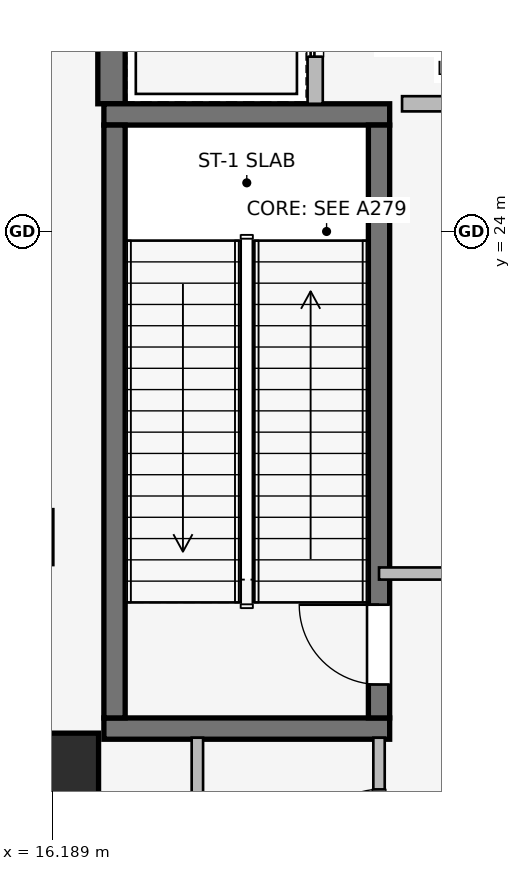
"""IFC4 building model, lengths in metres.
Left out: names, types, materials, properties, quantities, classifications, styles, units other than length and angle.
Written with IfcOpenShell. Run it as: python <this file> out.ifc"""

import sys

from ifc_helpers import new_model, si_unit, direction, frame, frame_2d, origin, origin_2d, place, context, subcontext, project, spatial, rectangle, extrude, element, fill, save


model = new_model("IFC4")
c1 = context("Model", 3, precision=1e-05, world=origin(), true_north=direction((0.0, 1.0)))
c2 = subcontext(c1, "Body", "Model", "MODEL_VIEW")
j1 = project(units=[si_unit("LENGTHUNIT", "METRE"), si_unit("PLANEANGLEUNIT", "RADIAN")], contexts=[c1])
p1 = place(None, origin())
s1 = spatial("IfcSite", under=j1, at=p1, CompositionType="ELEMENT")
p2 = place(p1, origin())
s2 = spatial("IfcBuilding", under=s1, at=p2, CompositionType="ELEMENT")
p3 = place(p2, frame((0.0, 0.0, 285.1)))
s3 = spatial("IfcBuildingStorey", under=s2, at=p3, CompositionType="ELEMENT", Elevation=285.1)
p4 = place(p3, frame((16.97, 25.68, 0.0), z_axis=(0.0, 0.0, 1.0), x_axis=(0.0, 1.0, 0.0)))
e1 = element("IfcWall", 1, at=p4, inside=s3, PredefinedType="SHEAR", context=c2, shape_type="SweptSolid", body=[
    extrude(rectangle(XDim=5.62, YDim=0.36, at=frame_2d((2.81, 0.0))), origin(), (0.0, 0.0, 1.0), 6.2),
])
for number, where, z_axis, x_axis in (
    (2, (16.87, 17.46, 0.0), (0.0, 0.0, 1.0), (1.0, 0.0, 0.0)),
    (3, (20.63, 25.54, 0.0), (0.0, 0.0, 1.0), (-1.0, 0.0, 0.0)),
):
    element("IfcWall", number, at=place(p3, frame(where, z_axis=z_axis, x_axis=x_axis)), inside=s3, PredefinedType="SHEAR", context=c2, shape_type="SweptSolid", body=[
        extrude(rectangle(XDim=3.76, YDim=0.28, at=frame_2d((1.88, 0.0))), origin(), (0.0, 0.0, 1.0), 6.2),
    ])
p5 = place(p3, frame((17.01, 25.4, 0.0), z_axis=(0.0, 0.0, 1.0), x_axis=(0.0, -1.0, 0.0)))
e4 = element("IfcWall", 4, at=p5, inside=s3, PredefinedType="SHEAR", context=c2, shape_type="SweptSolid", body=[
    extrude(rectangle(XDim=7.8, YDim=0.28, at=frame_2d((3.9, 0.0))), origin(), (0.0, 0.0, 1.0), 6.2),
])
p6 = place(p3, frame((20.49, 17.6, 0.0), z_axis=(0.0, 0.0, 1.0), x_axis=(0.0, 1.0, 0.0)))
e5 = element("IfcWall", 5, at=p6, inside=s3, PredefinedType="SHEAR", context=c2, shape_type="SweptSolid", body=[
    extrude(rectangle(XDim=7.8, YDim=0.28, at=frame_2d((3.9, 0.0))), origin(), (0.0, 0.0, 1.0), 6.2),
])
p7 = place(p6, frame((0.44, 0.0, 0.0)))
e6 = element("IfcOpeningElement", 6, at=p7, cuts=e5, PredefinedType="OPENING", context=c2, shape_type="SweptSolid", body=[
    extrude(rectangle(XDim=1.05, YDim=2.0, at=frame_2d((0.525, 1.0))), frame((0.0, 0.15, 0.0), z_axis=(0.0, -1.0, 0.0), x_axis=(1.0, 0.0, 0.0)), (0.0, 0.0, 1.0), 0.3),
])
p8 = place(p3, frame((16.3, 16.9, 0.0), z_axis=(0.0, 0.0, 1.0), x_axis=(1.0, 0.0, 0.0)))
e7 = element("IfcColumn", 7, at=p8, inside=s3, PredefinedType="COLUMN", context=c2, shape_type="SweptSolid", body=[
    extrude(rectangle(XDim=1.0, YDim=1.0, at=origin_2d()), origin(), (0.0, 0.0, 1.0), 6.2),
])
p9 = place(p3, frame((19.65, 25.68, 0.0), z_axis=(0.0, 0.0, 1.0), x_axis=(0.0, 1.0, 0.0)))
e8 = element("IfcWall", 8, at=p9, inside=s3, PredefinedType="PARTITIONING", context=c2, shape_type="SweptSolid", body=[
    extrude(rectangle(XDim=5.54, YDim=0.2, at=frame_2d((2.77, 0.0))), origin(), (0.0, 0.0, 1.0), 5.88),
])
p10 = place(p9, frame((0.62, 0.0, 0.0)))
e9 = element("IfcOpeningElement", 9, at=p10, cuts=e8, PredefinedType="OPENING", context=c2, shape_type="SweptSolid", body=[
    extrude(rectangle(XDim=1.1, YDim=2.2, at=frame_2d((0.55, 1.1))), frame((0.0, 0.11, 0.0), z_axis=(0.0, -1.0, 0.0), x_axis=(1.0, 0.0, 0.0)), (0.0, 0.0, 1.0), 0.22),
])
p11 = place(p9, frame((3.12, 0.0, 0.0)))
e10 = element("IfcOpeningElement", 10, at=p11, cuts=e8, PredefinedType="OPENING", context=c2, shape_type="SweptSolid", body=[
    extrude(rectangle(XDim=1.1, YDim=2.2, at=frame_2d((0.55, 1.1))), frame((0.0, 0.11, 0.0), z_axis=(0.0, -1.0, 0.0), x_axis=(1.0, 0.0, 0.0)), (0.0, 0.0, 1.0), 0.22),
])
p12 = place(p3, frame((20.793, 25.68, 0.0), z_axis=(0.0, 0.0, 1.0), x_axis=(1.0, 0.0, 0.0)))
e11 = element("IfcWall", 11, at=p12, inside=s3, PredefinedType="PARTITIONING", context=c2, shape_type="SweptSolid", body=[
    extrude(rectangle(XDim=2.887, YDim=0.2, at=frame_2d((1.443, 0.0))), origin(), (0.0, 0.0, 1.0), 5.88),
])
p13 = place(p3, frame((20.49, 19.5, 0.0), z_axis=(0.0, 0.0, 1.0), x_axis=(1.0, 0.0, 0.0)))
e12 = element("IfcWall", 12, at=p13, inside=s3, PredefinedType="PARTITIONING", context=c2, shape_type="SweptSolid", body=[
    extrude(rectangle(XDim=2.41, YDim=0.16, at=frame_2d((1.205, 0.0))), origin(), (0.0, 0.0, 1.0), 4.78),
])
p14 = place(p3, frame((18.1, 17.34, 0.0), z_axis=(0.0, 0.0, 1.0), x_axis=(0.0, -1.0, 0.0)))
e13 = element("IfcWall", 13, at=p14, inside=s3, PredefinedType="PARTITIONING", context=c2, shape_type="SweptSolid", body=[
    extrude(rectangle(XDim=4.133, YDim=0.15, at=frame_2d((2.066, 0.0))), origin(), (0.0, 0.0, 1.0), 5.88),
])
p15 = place(p3, frame((20.49, 13.2, 0.0), z_axis=(0.0, 0.0, 1.0), x_axis=(0.0, 1.0, 0.0)))
e14 = element("IfcWall", 14, at=p15, inside=s3, PredefinedType="PARTITIONING", context=c2, shape_type="SweptSolid", body=[
    extrude(rectangle(XDim=4.14, YDim=0.15, at=frame_2d((2.07, 0.0))), origin(), (0.0, 0.0, 1.0), 5.88),
])
p16 = place(p15, frame((0.45, 0.0, 0.0)))
e15 = element("IfcOpeningElement", 15, at=p16, cuts=e14, PredefinedType="OPENING", context=c2, shape_type="SweptSolid", body=[
    extrude(rectangle(XDim=0.86, YDim=2.0, at=frame_2d((0.43, 1.0))), frame((0.0, 0.085, 0.0), z_axis=(0.0, -1.0, 0.0), x_axis=(1.0, 0.0, 0.0)), (0.0, 0.0, 1.0), 0.17),
])
p17 = place(p15, frame((2.6, 0.0, 0.0)))
e16 = element("IfcOpeningElement", 16, at=p17, cuts=e14, PredefinedType="OPENING", context=c2, shape_type="SweptSolid", body=[
    extrude(rectangle(XDim=0.86, YDim=2.0, at=frame_2d((0.43, 1.0))), frame((0.0, 0.085, 0.0), z_axis=(0.0, -1.0, 0.0), x_axis=(1.0, 0.0, 0.0)), (0.0, 0.0, 1.0), 0.17),
])
p18 = place(p7, origin())
e17 = element("IfcDoor", 17, at=p18, inside=s3, OperationType="SINGLE_SWING_RIGHT", PredefinedType="DOOR", context=c2, shape_type="SweptSolid", body=[
    extrude(rectangle(XDim=1.05, YDim=2.0, at=frame_2d((0.525, 1.0))), frame((0.0, 0.025, 0.0), z_axis=(0.0, -1.0, 0.0), x_axis=(1.0, 0.0, 0.0)), (0.0, 0.0, 1.0), 0.05),
])
fill(e6, e17)
p19 = place(p10, origin())
e18 = element("IfcDoor", 18, at=p19, inside=s3, OperationType="SLIDING_TO_LEFT", PredefinedType="DOOR", context=c2, shape_type="SweptSolid", body=[
    extrude(rectangle(XDim=1.1, YDim=2.2, at=frame_2d((0.55, 1.1))), frame((0.0, 0.025, 0.0), z_axis=(0.0, -1.0, 0.0), x_axis=(1.0, 0.0, 0.0)), (0.0, 0.0, 1.0), 0.05),
])
fill(e9, e18)
p20 = place(p17, origin())
e19 = element("IfcDoor", 19, at=p20, inside=s3, OperationType="SINGLE_SWING_LEFT", PredefinedType="DOOR", context=c2, shape_type="SweptSolid", body=[
    extrude(rectangle(XDim=0.86, YDim=2.0, at=frame_2d((0.43, 1.0))), frame((0.0, 0.025, 0.0), z_axis=(0.0, -1.0, 0.0), x_axis=(1.0, 0.0, 0.0)), (0.0, 0.0, 1.0), 0.05),
])
fill(e16, e19)
save(model, sys.argv[1])
